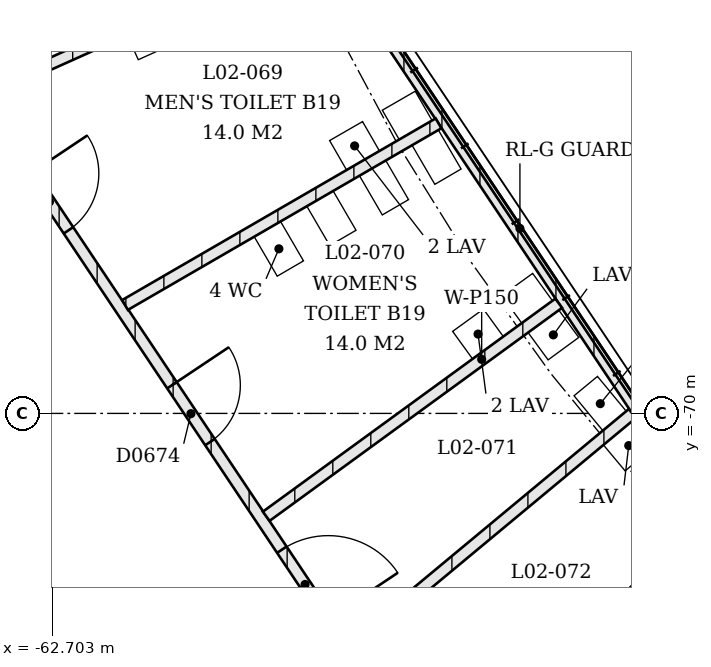
"""IFC4 building model, lengths in metres.
Left out: names, types, materials, properties, quantities, classifications, styles, units other than length and angle.
Written with IfcOpenShell. Run it as: python <this file> out.ifc"""

import sys

from ifc_helpers import new_model, si_unit, direction, frame, frame_2d, origin, place, context, subcontext, project, spatial, rectangle, extrude, element, fill, save


model = new_model("IFC4")
c1 = context("Model", 3, precision=1e-05, world=origin(), true_north=direction((0.0, 1.0)))
c2 = subcontext(c1, "Body", "Model", "MODEL_VIEW")
j1 = project(units=[si_unit("LENGTHUNIT", "METRE"), si_unit("PLANEANGLEUNIT", "RADIAN")], contexts=[c1])
p1 = place(None, origin())
s1 = spatial("IfcSite", under=j1, at=p1, CompositionType="ELEMENT")
p2 = place(p1, origin())
s2 = spatial("IfcBuilding", under=s1, at=p2, CompositionType="ELEMENT")
p3 = place(p2, frame((0.0, 0.0, 9.0)))
s3 = spatial("IfcBuildingStorey", under=s2, at=p3, CompositionType="ELEMENT", Elevation=9.0)
p4 = place(p3, frame((-59.337, -63.482, 0.0), z_axis=(0.0, 0.0, 1.0), x_axis=(0.555582843463, -0.831461186136, 0.0)))
e1 = element("IfcWall", 1, at=p4, inside=s3, PredefinedType="PARTITIONING", context=c2, shape_type="SweptSolid", body=[
    extrude(rectangle(XDim=9.89, YDim=0.15, at=frame_2d((4.945, 0.0))), origin(), (0.0, 0.0, 1.0), 3.0),
])
p5 = place(p3, frame((-63.715, -65.757, 0.0), z_axis=(0.0, 0.0, 1.0), x_axis=(0.555577934543, -0.831464466258, 0.0)))
e2 = element("IfcWall", 2, at=p5, inside=s3, PredefinedType="PARTITIONING", context=c2, shape_type="SweptSolid", body=[
    extrude(rectangle(XDim=10.972, YDim=0.15, at=frame_2d((5.486, 0.0))), origin(), (0.0, 0.0, 1.0), 3.0),
])
p6 = place(p5, frame((1.307, 0.0, 0.0)))
e3 = element("IfcOpeningElement", 3, at=p6, cuts=e2, PredefinedType="OPENING", context=c2, shape_type="SweptSolid", body=[
    extrude(rectangle(XDim=0.9, YDim=2.1, at=frame_2d((0.45, 1.05))), frame((0.0, 0.075, 0.0), z_axis=(0.0, -1.0, 0.0), x_axis=(1.0, 0.0, 0.0)), (0.0, 0.0, 1.0), 0.15),
])
p7 = place(p5, frame((4.658, 0.0, 0.0)))
e4 = element("IfcOpeningElement", 4, at=p7, cuts=e2, PredefinedType="OPENING", context=c2, shape_type="SweptSolid", body=[
    extrude(rectangle(XDim=0.9, YDim=2.1, at=frame_2d((0.45, 1.05))), frame((0.0, 0.075, 0.0), z_axis=(0.0, -1.0, 0.0), x_axis=(1.0, 0.0, 0.0)), (0.0, 0.0, 1.0), 0.15),
])
p8 = place(p5, frame((7.26, 0.0, 0.0)))
e5 = element("IfcOpeningElement", 5, at=p8, cuts=e2, PredefinedType="OPENING", context=c2, shape_type="SweptSolid", body=[
    extrude(rectangle(XDim=1.1, YDim=2.1, at=frame_2d((0.55, 1.05))), frame((0.0, 0.075, 0.0), z_axis=(0.0, -1.0, 0.0), x_axis=(1.0, 0.0, 0.0)), (0.0, 0.0, 1.0), 0.15),
])
p9 = place(p5, frame((9.314, 0.0, 0.0)))
e6 = element("IfcOpeningElement", 6, at=p9, cuts=e2, PredefinedType="OPENING", context=c2, shape_type="SweptSolid", body=[
    extrude(rectangle(XDim=1.1, YDim=2.1, at=frame_2d((0.55, 1.05))), frame((0.0, 0.075, 0.0), z_axis=(0.0, -1.0, 0.0), x_axis=(1.0, 0.0, 0.0)), (0.0, 0.0, 1.0), 0.15),
])
p10 = place(p3, frame((-59.201, -63.817, 0.0), z_axis=(0.0, 0.0, 1.0), x_axis=(-0.912239426779, -0.409657452305, 0.0)))
e7 = element("IfcWall", 7, at=p10, inside=s3, PredefinedType="PARTITIONING", context=c2, shape_type="SweptSolid", body=[
    extrude(rectangle(XDim=4.824, YDim=0.15, at=frame_2d((2.412, 0.0))), origin(), (0.0, 0.0, 1.0), 3.0),
])
p11 = place(p3, frame((-57.62, -66.184, 0.0), z_axis=(0.0, 0.0, 1.0), x_axis=(-0.865252065429, -0.5013370755, 0.0)))
e8 = element("IfcWall", 8, at=p11, inside=s3, PredefinedType="PARTITIONING", context=c2, shape_type="SweptSolid", body=[
    extrude(rectangle(XDim=4.767, YDim=0.15, at=frame_2d((2.383, 0.0))), origin(), (0.0, 0.0, 1.0), 3.0),
])
p12 = place(p3, frame((-56.038, -68.551, 0.0), z_axis=(0.0, 0.0, 1.0), x_axis=(-0.808345614711, -0.58870821905, 0.0)))
e9 = element("IfcWall", 9, at=p12, inside=s3, PredefinedType="PARTITIONING", context=c2, shape_type="SweptSolid", body=[
    extrude(rectangle(XDim=4.761, YDim=0.15, at=frame_2d((2.38, 0.0))), origin(), (0.0, 0.0, 1.0), 3.0),
])
p13 = place(p3, frame((-55.069, -70.001, 0.0), z_axis=(0.0, 0.0, 1.0), x_axis=(-0.769237079492, -0.63896346964, 0.0)))
e10 = element("IfcWall", 10, at=p13, inside=s3, PredefinedType="PARTITIONING", context=c2, shape_type="SweptSolid", body=[
    extrude(rectangle(XDim=4.783, YDim=0.15, at=frame_2d((2.391, 0.0))), origin(), (0.0, 0.0, 1.0), 3.0),
])
p14 = place(p3, frame((-54.1, -71.452, 0.0), z_axis=(0.0, 0.0, 1.0), x_axis=(-0.727577136184, -0.686025882093, 0.0)))
e11 = element("IfcWall", 11, at=p14, inside=s3, PredefinedType="PARTITIONING", context=c2, shape_type="SweptSolid", body=[
    extrude(rectangle(XDim=4.824, YDim=0.15, at=frame_2d((2.412, 0.0))), origin(), (0.0, 0.0, 1.0), 3.0),
])
p15 = place(p6, origin())
e12 = element("IfcDoor", 12, at=p15, inside=s3, OperationType="SINGLE_SWING_RIGHT", PredefinedType="DOOR", context=c2, shape_type="SweptSolid", body=[
    extrude(rectangle(XDim=0.9, YDim=2.1, at=frame_2d((0.45, 1.05))), frame((0.0, 0.025, 0.0), z_axis=(0.0, -1.0, 0.0), x_axis=(1.0, 0.0, 0.0)), (0.0, 0.0, 1.0), 0.05),
])
fill(e3, e12)
p16 = place(p7, origin())
e13 = element("IfcDoor", 13, at=p16, inside=s3, OperationType="SINGLE_SWING_RIGHT", PredefinedType="DOOR", context=c2, shape_type="SweptSolid", body=[
    extrude(rectangle(XDim=0.9, YDim=2.1, at=frame_2d((0.45, 1.05))), frame((0.0, 0.025, 0.0), z_axis=(0.0, -1.0, 0.0), x_axis=(1.0, 0.0, 0.0)), (0.0, 0.0, 1.0), 0.05),
])
fill(e4, e13)
p17 = place(p8, origin())
e14 = element("IfcDoor", 14, at=p17, inside=s3, OperationType="SINGLE_SWING_LEFT", PredefinedType="DOOR", context=c2, shape_type="SweptSolid", body=[
    extrude(rectangle(XDim=1.1, YDim=2.1, at=frame_2d((0.55, 1.05))), frame((0.0, 0.025, 0.0), z_axis=(0.0, -1.0, 0.0), x_axis=(1.0, 0.0, 0.0)), (0.0, 0.0, 1.0), 0.05),
])
fill(e5, e14)
save(model, sys.argv[1])
